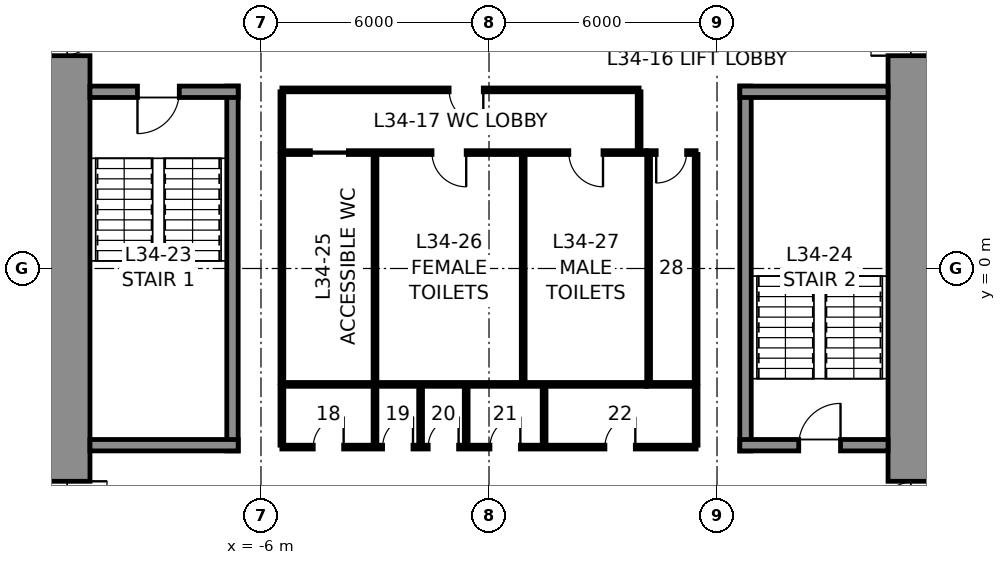
"""IFC4 building model, lengths in metres.
Left out: names, types, materials, properties, quantities, classifications, styles, units other than length and angle.
Written with IfcOpenShell. Run it as: python <this file> out.ifc"""

import sys

from ifc_helpers import new_model, si_unit, direction, frame, frame_2d, origin, place, context, subcontext, project, spatial, rectangle, extrude, element, fill, save


model = new_model("IFC4")
c1 = context("Model", 3, precision=1e-05, world=origin(), true_north=direction((0.0, 1.0)))
c2 = subcontext(c1, "Body", "Model", "MODEL_VIEW")
j1 = project(units=[si_unit("LENGTHUNIT", "METRE"), si_unit("PLANEANGLEUNIT", "RADIAN")], contexts=[c1])
p1 = place(None, origin())
s1 = spatial("IfcSite", under=j1, at=p1, CompositionType="ELEMENT")
p2 = place(p1, origin())
s2 = spatial("IfcBuilding", under=s1, at=p2, CompositionType="ELEMENT")
p3 = place(p2, frame((0.0, 0.0, 163.8)))
s3 = spatial("IfcBuildingStorey", under=s2, at=p3, CompositionType="ELEMENT", Elevation=163.8)
p4 = place(p3, frame((11.25, 10.5, 0.0), z_axis=(0.0, 0.0, 1.0), x_axis=(0.0, -1.0, 0.0)))
e1 = element("IfcWall", 1, at=p4, inside=s3, PredefinedType="SHEAR", context=c2, shape_type="SweptSolid", body=[
    extrude(rectangle(XDim=21.0, YDim=1.5, at=frame_2d((10.5, 0.0))), origin(), (0.0, 0.0, 1.0), 4.0),
])
p5 = place(p4, frame((3.7, 0.0, 0.0)))
e2 = element("IfcOpeningElement", 2, at=p5, cuts=e1, PredefinedType="OPENING", context=c2, shape_type="SweptSolid", body=[
    extrude(rectangle(XDim=1.2, YDim=2.3, at=frame_2d((0.6, 1.15))), frame((0.0, 0.76, 0.0), z_axis=(0.0, -1.0, 0.0), x_axis=(1.0, 0.0, 0.0)), (0.0, 0.0, 1.0), 1.52),
])
p6 = place(p4, frame((16.1, 0.0, 0.0)))
e3 = element("IfcOpeningElement", 3, at=p6, cuts=e1, PredefinedType="OPENING", context=c2, shape_type="SweptSolid", body=[
    extrude(rectangle(XDim=1.2, YDim=2.3, at=frame_2d((0.6, 1.15))), frame((0.0, 0.76, 0.0), z_axis=(0.0, -1.0, 0.0), x_axis=(1.0, 0.0, 0.0)), (0.0, 0.0, 1.0), 1.52),
])
p7 = place(p3, frame((-11.25, -10.5, 0.0), z_axis=(0.0, 0.0, 1.0), x_axis=(0.0, 1.0, 0.0)))
e4 = element("IfcWall", 4, at=p7, inside=s3, PredefinedType="SHEAR", context=c2, shape_type="SweptSolid", body=[
    extrude(rectangle(XDim=21.0, YDim=1.5, at=frame_2d((10.5, 0.0))), origin(), (0.0, 0.0, 1.0), 4.0),
])
p8 = place(p7, frame((16.1, 0.0, 0.0)))
e5 = element("IfcOpeningElement", 5, at=p8, cuts=e4, PredefinedType="OPENING", context=c2, shape_type="SweptSolid", body=[
    extrude(rectangle(XDim=1.2, YDim=2.3, at=frame_2d((0.6, 1.15))), frame((0.0, 0.76, 0.0), z_axis=(0.0, -1.0, 0.0), x_axis=(1.0, 0.0, 0.0)), (0.0, 0.0, 1.0), 1.52),
])
p9 = place(p7, frame((3.7, 0.0, 0.0)))
e6 = element("IfcOpeningElement", 6, at=p9, cuts=e4, PredefinedType="OPENING", context=c2, shape_type="SweptSolid", body=[
    extrude(rectangle(XDim=1.2, YDim=2.3, at=frame_2d((0.6, 1.15))), frame((0.0, 0.76, 0.0), z_axis=(0.0, -1.0, 0.0), x_axis=(1.0, 0.0, 0.0)), (0.0, 0.0, 1.0), 1.52),
])
p10 = place(p3, frame((-6.75, -4.8, 0.0), z_axis=(0.0, 0.0, 1.0), x_axis=(0.0, 1.0, 0.0)))
e7 = element("IfcWall", 7, at=p10, inside=s3, PredefinedType="SOLIDWALL", context=c2, shape_type="SweptSolid", body=[
    extrude(rectangle(XDim=9.6, YDim=0.3, at=frame_2d((4.8, 0.0))), origin(), (0.0, 0.0, 1.0), 3.75),
])
p11 = place(p3, frame((-10.5, 4.65, 0.0), z_axis=(0.0, 0.0, 1.0), x_axis=(1.0, 0.0, 0.0)))
e8 = element("IfcWall", 8, at=p11, inside=s3, PredefinedType="SOLIDWALL", context=c2, shape_type="SweptSolid", body=[
    extrude(rectangle(XDim=3.9, YDim=0.3, at=frame_2d((1.95, 0.0))), origin(), (0.0, 0.0, 1.0), 3.75),
])
p12 = place(p11, frame((1.25, 0.0, 0.0)))
e9 = element("IfcOpeningElement", 9, at=p12, cuts=e8, PredefinedType="OPENING", context=c2, shape_type="SweptSolid", body=[
    extrude(rectangle(XDim=1.1, YDim=2.3, at=frame_2d((0.55, 1.15))), frame((0.0, 0.16, 0.0), z_axis=(0.0, -1.0, 0.0), x_axis=(1.0, 0.0, 0.0)), (0.0, 0.0, 1.0), 0.32),
])
p13 = place(p3, frame((-6.6, -4.65, 0.0), z_axis=(0.0, 0.0, 1.0), x_axis=(-1.0, 0.0, 0.0)))
e10 = element("IfcWall", 10, at=p13, inside=s3, PredefinedType="SOLIDWALL", context=c2, shape_type="SweptSolid", body=[
    extrude(rectangle(XDim=3.9, YDim=0.3, at=frame_2d((1.95, 0.0))), origin(), (0.0, 0.0, 1.0), 3.75),
])
p14 = place(p3, frame((6.75, -4.8, 0.0), z_axis=(0.0, 0.0, 1.0), x_axis=(0.0, 1.0, 0.0)))
e11 = element("IfcWall", 11, at=p14, inside=s3, PredefinedType="SOLIDWALL", context=c2, shape_type="SweptSolid", body=[
    extrude(rectangle(XDim=9.6, YDim=0.3, at=frame_2d((4.8, 0.0))), origin(), (0.0, 0.0, 1.0), 3.75),
])
p15 = place(p3, frame((6.6, 4.65, 0.0), z_axis=(0.0, 0.0, 1.0), x_axis=(1.0, 0.0, 0.0)))
e12 = element("IfcWall", 12, at=p15, inside=s3, PredefinedType="SOLIDWALL", context=c2, shape_type="SweptSolid", body=[
    extrude(rectangle(XDim=3.9, YDim=0.3, at=frame_2d((1.95, 0.0))), origin(), (0.0, 0.0, 1.0), 3.75),
])
p16 = place(p3, frame((10.5, -4.65, 0.0), z_axis=(0.0, 0.0, 1.0), x_axis=(-1.0, 0.0, 0.0)))
e13 = element("IfcWall", 13, at=p16, inside=s3, PredefinedType="SOLIDWALL", context=c2, shape_type="SweptSolid", body=[
    extrude(rectangle(XDim=3.9, YDim=0.3, at=frame_2d((1.95, 0.0))), origin(), (0.0, 0.0, 1.0), 3.75),
])
p17 = place(p16, frame((1.25, 0.0, 0.0)))
e14 = element("IfcOpeningElement", 14, at=p17, cuts=e13, PredefinedType="OPENING", context=c2, shape_type="SweptSolid", body=[
    extrude(rectangle(XDim=1.1, YDim=2.3, at=frame_2d((0.55, 1.15))), frame((0.0, 0.16, 0.0), z_axis=(0.0, -1.0, 0.0), x_axis=(1.0, 0.0, 0.0)), (0.0, 0.0, 1.0), 0.32),
])
p18 = place(p3, frame((-5.45, 3.05, 0.0), z_axis=(0.0, 0.0, 1.0), x_axis=(1.0, 0.0, 0.0)))
e15 = element("IfcWall", 15, at=p18, inside=s3, PredefinedType="PARTITIONING", context=c2, shape_type="SweptSolid", body=[
    extrude(rectangle(XDim=9.6, YDim=0.1, at=frame_2d((4.8, 0.0))), origin(), (0.0, 0.0, 1.0), 3.75),
])
p19 = place(p18, frame((0.75, 0.0, 0.0)))
e16 = element("IfcOpeningElement", 16, at=p19, cuts=e15, PredefinedType="OPENING", context=c2, shape_type="SweptSolid", body=[
    extrude(rectangle(XDim=1.0, YDim=2.3, at=frame_2d((0.5, 1.15))), frame((0.0, 0.06, 0.0), z_axis=(0.0, -1.0, 0.0), x_axis=(1.0, 0.0, 0.0)), (0.0, 0.0, 1.0), 0.12),
])
p20 = place(p18, frame((3.95, 0.0, 0.0)))
e17 = element("IfcOpeningElement", 17, at=p20, cuts=e15, PredefinedType="OPENING", context=c2, shape_type="SweptSolid", body=[
    extrude(rectangle(XDim=0.9, YDim=2.3, at=frame_2d((0.45, 1.15))), frame((0.0, 0.06, 0.0), z_axis=(0.0, -1.0, 0.0), x_axis=(1.0, 0.0, 0.0)), (0.0, 0.0, 1.0), 0.12),
])
p21 = place(p18, frame((7.55, 0.0, 0.0)))
e18 = element("IfcOpeningElement", 18, at=p21, cuts=e15, PredefinedType="OPENING", context=c2, shape_type="SweptSolid", body=[
    extrude(rectangle(XDim=0.9, YDim=2.3, at=frame_2d((0.45, 1.15))), frame((0.0, 0.06, 0.0), z_axis=(0.0, -1.0, 0.0), x_axis=(1.0, 0.0, 0.0)), (0.0, 0.0, 1.0), 0.12),
])
p22 = place(p3, frame((4.15, 3.05, 0.0), z_axis=(0.0, 0.0, 1.0), x_axis=(1.0, 0.0, 0.0)))
e19 = element("IfcWall", 19, at=p22, inside=s3, PredefinedType="PARTITIONING", context=c2, shape_type="SweptSolid", body=[
    extrude(rectangle(XDim=1.3, YDim=0.1, at=frame_2d((0.65, 0.0))), origin(), (0.0, 0.0, 1.0), 3.75),
])
p23 = place(p22, frame((0.25, 0.0, 0.0)))
e20 = element("IfcOpeningElement", 20, at=p23, cuts=e19, PredefinedType="OPENING", context=c2, shape_type="SweptSolid", body=[
    extrude(rectangle(XDim=0.8, YDim=2.3, at=frame_2d((0.4, 1.15))), frame((0.0, 0.06, 0.0), z_axis=(0.0, -1.0, 0.0), x_axis=(1.0, 0.0, 0.0)), (0.0, 0.0, 1.0), 0.12),
])
p24 = place(p3, frame((4.15, -3.05, 0.0), z_axis=(0.0, 0.0, 1.0), x_axis=(-1.0, 0.0, 0.0)))
e21 = element("IfcWall", 21, at=p24, inside=s3, PredefinedType="PARTITIONING", context=c2, shape_type="SweptSolid", body=[
    extrude(rectangle(XDim=9.6, YDim=0.1, at=frame_2d((4.8, 0.0))), origin(), (0.0, 0.0, 1.0), 3.75),
])
p25 = place(p3, frame((5.45, -3.05, 0.0), z_axis=(0.0, 0.0, 1.0), x_axis=(-1.0, 0.0, 0.0)))
e22 = element("IfcWall", 22, at=p25, inside=s3, PredefinedType="PARTITIONING", context=c2, shape_type="SweptSolid", body=[
    extrude(rectangle(XDim=1.3, YDim=0.1, at=frame_2d((0.65, 0.0))), origin(), (0.0, 0.0, 1.0), 3.75),
])
for number, where, z_axis, x_axis in (
    (23, (5.45, 3.0, 0.0), (0.0, 0.0, 1.0), (0.0, -1.0, 0.0)),
    (24, (-5.45, -3.0, 0.0), (0.0, 0.0, 1.0), (0.0, 1.0, 0.0)),
    (25, (-3.0, -3.0, 0.0), (0.0, 0.0, 1.0), (0.0, 1.0, 0.0)),
    (26, (0.9, -3.0, 0.0), (0.0, 0.0, 1.0), (0.0, 1.0, 0.0)),
    (27, (4.2, -3.0, 0.0), (0.0, 0.0, 1.0), (0.0, 1.0, 0.0)),
):
    element("IfcWall", number, at=place(p3, frame(where, z_axis=z_axis, x_axis=x_axis)), inside=s3, PredefinedType="PARTITIONING", context=c2, shape_type="SweptSolid", body=[
        extrude(rectangle(XDim=6.0, YDim=0.1, at=frame_2d((3.0, 0.0))), origin(), (0.0, 0.0, 1.0), 3.75),
    ])
p26 = place(p3, frame((-5.45, 4.7, 0.0), z_axis=(0.0, 0.0, 1.0), x_axis=(1.0, 0.0, 0.0)))
e28 = element("IfcWall", 28, at=p26, inside=s3, PredefinedType="PARTITIONING", context=c2, shape_type="SweptSolid", body=[
    extrude(rectangle(XDim=9.4, YDim=0.1, at=frame_2d((4.7, 0.0))), origin(), (0.0, 0.0, 1.0), 3.75),
])
p27 = place(p26, frame((4.4, 0.0, 0.0)))
e29 = element("IfcOpeningElement", 29, at=p27, cuts=e28, PredefinedType="OPENING", context=c2, shape_type="SweptSolid", body=[
    extrude(rectangle(XDim=0.9, YDim=2.3, at=frame_2d((0.45, 1.15))), frame((0.0, 0.06, 0.0), z_axis=(0.0, -1.0, 0.0), x_axis=(1.0, 0.0, 0.0)), (0.0, 0.0, 1.0), 0.12),
])
for number, where, z_axis, x_axis in (
    (30, (-5.45, 3.1, 0.0), (0.0, 0.0, 1.0), (0.0, 1.0, 0.0)),
    (31, (3.95, 3.1, 0.0), (0.0, 0.0, 1.0), (0.0, 1.0, 0.0)),
):
    element("IfcWall", number, at=place(p3, frame(where, z_axis=z_axis, x_axis=x_axis)), inside=s3, PredefinedType="PARTITIONING", context=c2, shape_type="SweptSolid", body=[
        extrude(rectangle(XDim=1.55, YDim=0.1, at=frame_2d((0.775, 0.0))), origin(), (0.0, 0.0, 1.0), 3.75),
    ])
p28 = place(p3, frame((5.45, -4.7, 0.0), z_axis=(0.0, 0.0, 1.0), x_axis=(-1.0, 0.0, 0.0)))
e32 = element("IfcWall", 32, at=p28, inside=s3, PredefinedType="PARTITIONING", context=c2, shape_type="SweptSolid", body=[
    extrude(rectangle(XDim=10.9, YDim=0.1, at=frame_2d((5.45, 0.0))), origin(), (0.0, 0.0, 1.0), 3.75),
])
p29 = place(p28, frame((9.275, 0.0, 0.0)))
e33 = element("IfcOpeningElement", 33, at=p29, cuts=e32, PredefinedType="OPENING", context=c2, shape_type="SweptSolid", body=[
    extrude(rectangle(XDim=0.8, YDim=2.3, at=frame_2d((0.4, 1.15))), frame((0.0, 0.06, 0.0), z_axis=(0.0, -1.0, 0.0), x_axis=(1.0, 0.0, 0.0)), (0.0, 0.0, 1.0), 0.12),
])
p30 = place(p28, frame((7.45, 0.0, 0.0)))
e34 = element("IfcOpeningElement", 34, at=p30, cuts=e32, PredefinedType="OPENING", context=c2, shape_type="SweptSolid", body=[
    extrude(rectangle(XDim=0.8, YDim=2.3, at=frame_2d((0.4, 1.15))), frame((0.0, 0.06, 0.0), z_axis=(0.0, -1.0, 0.0), x_axis=(1.0, 0.0, 0.0)), (0.0, 0.0, 1.0), 0.12),
])
p31 = place(p28, frame((6.25, 0.0, 0.0)))
e35 = element("IfcOpeningElement", 35, at=p31, cuts=e32, PredefinedType="OPENING", context=c2, shape_type="SweptSolid", body=[
    extrude(rectangle(XDim=0.8, YDim=2.3, at=frame_2d((0.4, 1.15))), frame((0.0, 0.06, 0.0), z_axis=(0.0, -1.0, 0.0), x_axis=(1.0, 0.0, 0.0)), (0.0, 0.0, 1.0), 0.12),
])
p32 = place(p28, frame((4.625, 0.0, 0.0)))
e36 = element("IfcOpeningElement", 36, at=p32, cuts=e32, PredefinedType="OPENING", context=c2, shape_type="SweptSolid", body=[
    extrude(rectangle(XDim=0.8, YDim=2.3, at=frame_2d((0.4, 1.15))), frame((0.0, 0.06, 0.0), z_axis=(0.0, -1.0, 0.0), x_axis=(1.0, 0.0, 0.0)), (0.0, 0.0, 1.0), 0.12),
])
p33 = place(p28, frame((1.6, 0.0, 0.0)))
e37 = element("IfcOpeningElement", 37, at=p33, cuts=e32, PredefinedType="OPENING", context=c2, shape_type="SweptSolid", body=[
    extrude(rectangle(XDim=0.8, YDim=2.3, at=frame_2d((0.4, 1.15))), frame((0.0, 0.06, 0.0), z_axis=(0.0, -1.0, 0.0), x_axis=(1.0, 0.0, 0.0)), (0.0, 0.0, 1.0), 0.12),
])
for number, where, z_axis, x_axis in (
    (38, (-5.45, -3.1, 0.0), (0.0, 0.0, 1.0), (0.0, -1.0, 0.0)),
    (39, (5.45, -3.1, 0.0), (0.0, 0.0, 1.0), (0.0, -1.0, 0.0)),
    (40, (-3.0, -3.1, 0.0), (0.0, 0.0, 1.0), (0.0, -1.0, 0.0)),
    (41, (-1.8, -3.1, 0.0), (0.0, 0.0, 1.0), (0.0, -1.0, 0.0)),
    (42, (-0.6, -3.1, 0.0), (0.0, 0.0, 1.0), (0.0, -1.0, 0.0)),
    (43, (1.45, -3.1, 0.0), (0.0, 0.0, 1.0), (0.0, -1.0, 0.0)),
):
    element("IfcWall", number, at=place(p3, frame(where, z_axis=z_axis, x_axis=x_axis)), inside=s3, PredefinedType="PARTITIONING", context=c2, shape_type="SweptSolid", body=[
        extrude(rectangle(XDim=1.55, YDim=0.1, at=frame_2d((0.775, 0.0))), origin(), (0.0, 0.0, 1.0), 3.75),
    ])
p34 = place(p12, frame((1.1, 0.0, 0.0), z_axis=(0.0, 0.0, 1.0), x_axis=(-1.0, 0.0, 0.0)))
e44 = element("IfcDoor", 44, at=p34, inside=s3, OperationType="SINGLE_SWING_RIGHT", PredefinedType="DOOR", context=c2, shape_type="SweptSolid", body=[
    extrude(rectangle(XDim=1.1, YDim=2.3, at=frame_2d((0.55, 1.15))), frame((0.0, 0.025, 0.0), z_axis=(0.0, -1.0, 0.0), x_axis=(1.0, 0.0, 0.0)), (0.0, 0.0, 1.0), 0.05),
])
fill(e9, e44)
p35 = place(p17, frame((1.1, 0.0, 0.0), z_axis=(0.0, 0.0, 1.0), x_axis=(-1.0, 0.0, 0.0)))
e45 = element("IfcDoor", 45, at=p35, inside=s3, OperationType="SINGLE_SWING_RIGHT", PredefinedType="DOOR", context=c2, shape_type="SweptSolid", body=[
    extrude(rectangle(XDim=1.1, YDim=2.3, at=frame_2d((0.55, 1.15))), frame((0.0, 0.025, 0.0), z_axis=(0.0, -1.0, 0.0), x_axis=(1.0, 0.0, 0.0)), (0.0, 0.0, 1.0), 0.05),
])
fill(e14, e45)
p36 = place(p19, frame((1.0, 0.0, 0.0), z_axis=(0.0, 0.0, 1.0), x_axis=(-1.0, 0.0, 0.0)))
e46 = element("IfcDoor", 46, at=p36, inside=s3, OperationType="SLIDING_TO_LEFT", PredefinedType="DOOR", context=c2, shape_type="SweptSolid", body=[
    extrude(rectangle(XDim=1.0, YDim=2.3, at=frame_2d((0.5, 1.15))), frame((0.0, 0.025, 0.0), z_axis=(0.0, -1.0, 0.0), x_axis=(1.0, 0.0, 0.0)), (0.0, 0.0, 1.0), 0.05),
])
fill(e16, e46)
p37 = place(p20, frame((0.9, 0.0, 0.0), z_axis=(0.0, 0.0, 1.0), x_axis=(-1.0, 0.0, 0.0)))
e47 = element("IfcDoor", 47, at=p37, inside=s3, OperationType="SINGLE_SWING_LEFT", PredefinedType="DOOR", context=c2, shape_type="SweptSolid", body=[
    extrude(rectangle(XDim=0.9, YDim=2.3, at=frame_2d((0.45, 1.15))), frame((0.0, 0.025, 0.0), z_axis=(0.0, -1.0, 0.0), x_axis=(1.0, 0.0, 0.0)), (0.0, 0.0, 1.0), 0.05),
])
fill(e17, e47)
p38 = place(p21, frame((0.9, 0.0, 0.0), z_axis=(0.0, 0.0, 1.0), x_axis=(-1.0, 0.0, 0.0)))
e48 = element("IfcDoor", 48, at=p38, inside=s3, OperationType="SINGLE_SWING_LEFT", PredefinedType="DOOR", context=c2, shape_type="SweptSolid", body=[
    extrude(rectangle(XDim=0.9, YDim=2.3, at=frame_2d((0.45, 1.15))), frame((0.0, 0.025, 0.0), z_axis=(0.0, -1.0, 0.0), x_axis=(1.0, 0.0, 0.0)), (0.0, 0.0, 1.0), 0.05),
])
fill(e18, e48)
p39 = place(p23, frame((0.8, 0.0, 0.0), z_axis=(0.0, 0.0, 1.0), x_axis=(-1.0, 0.0, 0.0)))
e49 = element("IfcDoor", 49, at=p39, inside=s3, OperationType="SINGLE_SWING_RIGHT", PredefinedType="DOOR", context=c2, shape_type="SweptSolid", body=[
    extrude(rectangle(XDim=0.8, YDim=2.3, at=frame_2d((0.4, 1.15))), frame((0.0, 0.025, 0.0), z_axis=(0.0, -1.0, 0.0), x_axis=(1.0, 0.0, 0.0)), (0.0, 0.0, 1.0), 0.05),
])
fill(e20, e49)
p40 = place(p27, frame((0.9, 0.0, 0.0), z_axis=(0.0, 0.0, 1.0), x_axis=(-1.0, 0.0, 0.0)))
e50 = element("IfcDoor", 50, at=p40, inside=s3, OperationType="SINGLE_SWING_LEFT", PredefinedType="DOOR", context=c2, shape_type="SweptSolid", body=[
    extrude(rectangle(XDim=0.9, YDim=2.3, at=frame_2d((0.45, 1.15))), frame((0.0, 0.025, 0.0), z_axis=(0.0, -1.0, 0.0), x_axis=(1.0, 0.0, 0.0)), (0.0, 0.0, 1.0), 0.05),
])
fill(e29, e50)
p41 = place(p29, frame((0.8, 0.0, 0.0), z_axis=(0.0, 0.0, 1.0), x_axis=(-1.0, 0.0, 0.0)))
e51 = element("IfcDoor", 51, at=p41, inside=s3, OperationType="SINGLE_SWING_RIGHT", PredefinedType="DOOR", context=c2, shape_type="SweptSolid", body=[
    extrude(rectangle(XDim=0.8, YDim=2.3, at=frame_2d((0.4, 1.15))), frame((0.0, 0.025, 0.0), z_axis=(0.0, -1.0, 0.0), x_axis=(1.0, 0.0, 0.0)), (0.0, 0.0, 1.0), 0.05),
])
fill(e33, e51)
p42 = place(p30, frame((0.8, 0.0, 0.0), z_axis=(0.0, 0.0, 1.0), x_axis=(-1.0, 0.0, 0.0)))
e52 = element("IfcDoor", 52, at=p42, inside=s3, OperationType="SINGLE_SWING_RIGHT", PredefinedType="DOOR", context=c2, shape_type="SweptSolid", body=[
    extrude(rectangle(XDim=0.8, YDim=2.3, at=frame_2d((0.4, 1.15))), frame((0.0, 0.025, 0.0), z_axis=(0.0, -1.0, 0.0), x_axis=(1.0, 0.0, 0.0)), (0.0, 0.0, 1.0), 0.05),
])
fill(e34, e52)
p43 = place(p31, frame((0.8, 0.0, 0.0), z_axis=(0.0, 0.0, 1.0), x_axis=(-1.0, 0.0, 0.0)))
e53 = element("IfcDoor", 53, at=p43, inside=s3, OperationType="SINGLE_SWING_RIGHT", PredefinedType="DOOR", context=c2, shape_type="SweptSolid", body=[
    extrude(rectangle(XDim=0.8, YDim=2.3, at=frame_2d((0.4, 1.15))), frame((0.0, 0.025, 0.0), z_axis=(0.0, -1.0, 0.0), x_axis=(1.0, 0.0, 0.0)), (0.0, 0.0, 1.0), 0.05),
])
fill(e35, e53)
p44 = place(p32, frame((0.8, 0.0, 0.0), z_axis=(0.0, 0.0, 1.0), x_axis=(-1.0, 0.0, 0.0)))
e54 = element("IfcDoor", 54, at=p44, inside=s3, OperationType="SINGLE_SWING_RIGHT", PredefinedType="DOOR", context=c2, shape_type="SweptSolid", body=[
    extrude(rectangle(XDim=0.8, YDim=2.3, at=frame_2d((0.4, 1.15))), frame((0.0, 0.025, 0.0), z_axis=(0.0, -1.0, 0.0), x_axis=(1.0, 0.0, 0.0)), (0.0, 0.0, 1.0), 0.05),
])
fill(e36, e54)
p45 = place(p33, frame((0.8, 0.0, 0.0), z_axis=(0.0, 0.0, 1.0), x_axis=(-1.0, 0.0, 0.0)))
e55 = element("IfcDoor", 55, at=p45, inside=s3, OperationType="SINGLE_SWING_RIGHT", PredefinedType="DOOR", context=c2, shape_type="SweptSolid", body=[
    extrude(rectangle(XDim=0.8, YDim=2.3, at=frame_2d((0.4, 1.15))), frame((0.0, 0.025, 0.0), z_axis=(0.0, -1.0, 0.0), x_axis=(1.0, 0.0, 0.0)), (0.0, 0.0, 1.0), 0.05),
])
fill(e37, e55)
p46 = place(p8, frame((1.2, 0.0, 0.0), z_axis=(0.0, 0.0, 1.0), x_axis=(-1.0, 0.0, 0.0)))
e56 = element("IfcDoor", 56, at=p46, inside=s3, OperationType="SINGLE_SWING_LEFT", PredefinedType="DOOR", context=c2, shape_type="SweptSolid", body=[
    extrude(rectangle(XDim=1.2, YDim=2.3, at=frame_2d((0.6, 1.15))), frame((0.0, 0.025, 0.0), z_axis=(0.0, -1.0, 0.0), x_axis=(1.0, 0.0, 0.0)), (0.0, 0.0, 1.0), 0.05),
])
fill(e5, e56)
p47 = place(p9, frame((1.2, 0.0, 0.0), z_axis=(0.0, 0.0, 1.0), x_axis=(-1.0, 0.0, 0.0)))
e57 = element("IfcDoor", 57, at=p47, inside=s3, OperationType="SINGLE_SWING_LEFT", PredefinedType="DOOR", context=c2, shape_type="SweptSolid", body=[
    extrude(rectangle(XDim=1.2, YDim=2.3, at=frame_2d((0.6, 1.15))), frame((0.0, 0.025, 0.0), z_axis=(0.0, -1.0, 0.0), x_axis=(1.0, 0.0, 0.0)), (0.0, 0.0, 1.0), 0.05),
])
fill(e6, e57)
p48 = place(p5, frame((1.2, 0.0, 0.0), z_axis=(0.0, 0.0, 1.0), x_axis=(-1.0, 0.0, 0.0)))
e58 = element("IfcDoor", 58, at=p48, inside=s3, OperationType="SINGLE_SWING_LEFT", PredefinedType="DOOR", context=c2, shape_type="SweptSolid", body=[
    extrude(rectangle(XDim=1.2, YDim=2.3, at=frame_2d((0.6, 1.15))), frame((0.0, 0.025, 0.0), z_axis=(0.0, -1.0, 0.0), x_axis=(1.0, 0.0, 0.0)), (0.0, 0.0, 1.0), 0.05),
])
fill(e2, e58)
p49 = place(p6, frame((1.2, 0.0, 0.0), z_axis=(0.0, 0.0, 1.0), x_axis=(-1.0, 0.0, 0.0)))
e59 = element("IfcDoor", 59, at=p49, inside=s3, OperationType="SINGLE_SWING_LEFT", PredefinedType="DOOR", context=c2, shape_type="SweptSolid", body=[
    extrude(rectangle(XDim=1.2, YDim=2.3, at=frame_2d((0.6, 1.15))), frame((0.0, 0.025, 0.0), z_axis=(0.0, -1.0, 0.0), x_axis=(1.0, 0.0, 0.0)), (0.0, 0.0, 1.0), 0.05),
])
fill(e3, e59)
save(model, sys.argv[1])
